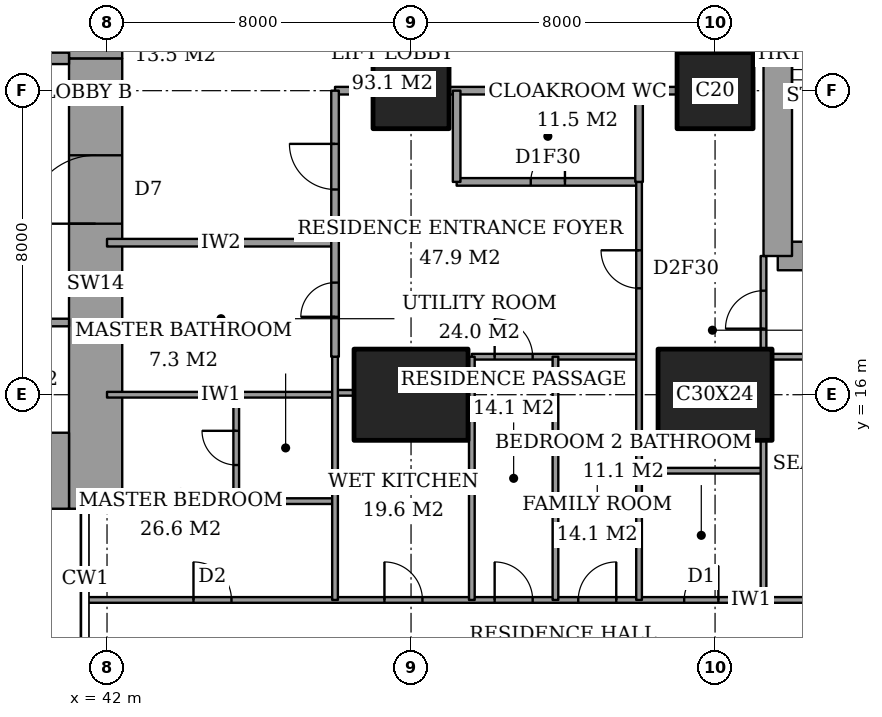
"""IFC4 building model, lengths in metres.
Left out: names, types, materials, properties, quantities, classifications, styles, units other than length and angle.
Written with IfcOpenShell. Run it as: python <this file> out.ifc"""

import sys

from ifc_helpers import new_model, si_unit, direction, frame, frame_2d, origin, origin_2d, place, context, subcontext, project, spatial, rectangle, extrude, element, fill, save


model = new_model("IFC4")
c1 = context("Model", 3, precision=1e-05, world=origin(), true_north=direction((0.0, 1.0)))
c2 = subcontext(c1, "Body", "Model", "MODEL_VIEW")
j1 = project(units=[si_unit("LENGTHUNIT", "METRE"), si_unit("PLANEANGLEUNIT", "RADIAN")], contexts=[c1])
p1 = place(None, origin())
s1 = spatial("IfcSite", under=j1, at=p1, CompositionType="ELEMENT")
p2 = place(p1, origin())
s2 = spatial("IfcBuilding", under=s1, at=p2, CompositionType="ELEMENT")
p3 = place(p2, frame((0.0, 0.0, 87.2)))
s3 = spatial("IfcBuildingStorey", under=s2, at=p3, CompositionType="ELEMENT", Elevation=87.2)
p4 = place(p3, frame((50.0, 16.0, 0.0), z_axis=(0.0, 0.0, 1.0), x_axis=(1.0, 0.0, 0.0)))
e1 = element("IfcColumn", 1, at=p4, inside=s3, PredefinedType="COLUMN", context=c2, shape_type="SweptSolid", body=[
    extrude(rectangle(XDim=3.0, YDim=2.4, at=origin_2d()), origin(), (0.0, 0.0, 1.0), 3.6),
])
p5 = place(p3, frame((50.0, 24.0, 0.0), z_axis=(0.0, 0.0, 1.0), x_axis=(1.0, 0.0, 0.0)))
e2 = element("IfcColumn", 2, at=p5, inside=s3, PredefinedType="COLUMN", context=c2, shape_type="SweptSolid", body=[
    extrude(rectangle(XDim=2.0, YDim=2.0, at=origin_2d()), origin(), (0.0, 0.0, 1.0), 3.6),
])
p6 = place(p3, frame((58.0, 16.0, 0.0), z_axis=(0.0, 0.0, 1.0), x_axis=(1.0, 0.0, 0.0)))
e3 = element("IfcColumn", 3, at=p6, inside=s3, PredefinedType="COLUMN", context=c2, shape_type="SweptSolid", body=[
    extrude(rectangle(XDim=3.0, YDim=2.4, at=origin_2d()), origin(), (0.0, 0.0, 1.0), 3.6),
])
p7 = place(p3, frame((58.0, 24.0, 0.0), z_axis=(0.0, 0.0, 1.0), x_axis=(1.0, 0.0, 0.0)))
e4 = element("IfcColumn", 4, at=p7, inside=s3, PredefinedType="COLUMN", context=c2, shape_type="SweptSolid", body=[
    extrude(rectangle(XDim=2.0, YDim=2.0, at=origin_2d()), origin(), (0.0, 0.0, 1.0), 3.6),
])
p8 = place(p3, frame((37.85, 14.0, 0.0), z_axis=(0.0, 0.0, 1.0), x_axis=(1.0, 0.0, 0.0)))
e5 = element("IfcWall", 5, at=p8, inside=s3, PredefinedType="SHEAR", context=c2, shape_type="SweptSolid", body=[
    extrude(rectangle(XDim=3.15, YDim=2.0, at=frame_2d((1.575, 0.0))), origin(), (0.0, 0.0, 1.0), 3.6),
])
p9 = place(p3, frame((41.7, 13.0, 0.0), z_axis=(0.0, 0.0, 1.0), x_axis=(0.0, 1.0, 0.0)))
e6 = element("IfcWall", 6, at=p9, inside=s3, PredefinedType="SHEAR", context=c2, shape_type="SweptSolid", body=[
    extrude(rectangle(XDim=11.85, YDim=1.4, at=frame_2d((5.925, 0.0))), origin(), (0.0, 0.0, 1.0), 3.6),
])
p10 = place(p9, frame((7.5, 0.0, 0.0)))
e7 = element("IfcOpeningElement", 7, at=p10, cuts=e6, PredefinedType="OPENING", context=c2, shape_type="SweptSolid", body=[
    extrude(rectangle(XDim=1.8, YDim=2.4, at=frame_2d((0.9, 1.2))), frame((0.0, 0.71, 0.0), z_axis=(0.0, -1.0, 0.0), x_axis=(1.0, 0.0, 0.0)), (0.0, 0.0, 1.0), 1.42),
])
p11 = place(p3, frame((41.7, 24.85, 0.0), z_axis=(0.0, 0.0, 1.0), x_axis=(0.0, 1.0, 0.0)))
e8 = element("IfcWall", 8, at=p11, inside=s3, PredefinedType="SHEAR", context=c2, shape_type="SweptSolid", body=[
    extrude(rectangle(XDim=10.15, YDim=1.4, at=frame_2d((5.075, 0.0))), origin(), (0.0, 0.0, 1.0), 3.6),
])
p12 = place(p3, frame((37.85, 24.85, 0.0), z_axis=(0.0, 0.0, 1.0), x_axis=(1.0, 0.0, 0.0)))
e9 = element("IfcWall", 9, at=p12, inside=s3, PredefinedType="SHEAR", context=c2, shape_type="SweptSolid", body=[
    extrude(rectangle(XDim=3.15, YDim=0.3, at=frame_2d((1.575, 0.0))), origin(), (0.0, 0.0, 1.0), 3.6),
])
p13 = place(p12, frame((0.95, 0.0, 0.0)))
e10 = element("IfcOpeningElement", 10, at=p13, cuts=e9, PredefinedType="OPENING", context=c2, shape_type="SweptSolid", body=[
    extrude(rectangle(XDim=1.0, YDim=2.1, at=frame_2d((0.5, 1.05))), frame((0.0, 0.16, 0.0), z_axis=(0.0, -1.0, 0.0), x_axis=(1.0, 0.0, 0.0)), (0.0, 0.0, 1.0), 0.32),
])
p14 = place(p3, frame((59.65, 19.65, 0.0), z_axis=(0.0, 0.0, 1.0), x_axis=(1.0, 0.0, 0.0)))
e11 = element("IfcWall", 11, at=p14, inside=s3, PredefinedType="SHEAR", context=c2, shape_type="SweptSolid", body=[
    extrude(rectangle(XDim=4.45, YDim=0.75, at=frame_2d((2.225, 0.0))), origin(), (0.0, 0.0, 1.0), 3.6),
])
p15 = place(p3, frame((59.65, 28.35, 0.0), z_axis=(0.0, 0.0, 1.0), x_axis=(0.0, -1.0, 0.0)))
e12 = element("IfcWall", 12, at=p15, inside=s3, PredefinedType="SHEAR", context=c2, shape_type="SweptSolid", body=[
    extrude(rectangle(XDim=8.7, YDim=0.75, at=frame_2d((4.35, 0.0))), origin(), (0.0, 0.0, 1.0), 3.6),
])
p16 = place(p15, frame((0.975, 0.0, 0.0)))
e13 = element("IfcOpeningElement", 13, at=p16, cuts=e12, PredefinedType="OPENING", context=c2, shape_type="SweptSolid", body=[
    extrude(rectangle(XDim=1.0, YDim=2.1, at=frame_2d((0.5, 1.05))), frame((0.0, 0.385, 0.0), z_axis=(0.0, -1.0, 0.0), x_axis=(1.0, 0.0, 0.0)), (0.0, 0.0, 1.0), 0.77),
])
p17 = place(p3, frame((41.439, 10.6, 0.0), z_axis=(0.0, 0.0, 1.0), x_axis=(1.0, 0.0, 0.0)))
e14 = element("IfcWall", 14, at=p17, inside=s3, PredefinedType="PARTITIONING", context=c2, shape_type="SweptSolid", body=[
    extrude(rectangle(XDim=25.011, YDim=0.15, at=frame_2d((12.505, 0.0))), origin(), (0.0, 0.0, 1.0), 3.25),
])
p18 = place(p17, frame((10.761, 0.0, 0.0)))
e15 = element("IfcOpeningElement", 15, at=p18, cuts=e14, PredefinedType="OPENING", context=c2, shape_type="SweptSolid", body=[
    extrude(rectangle(XDim=1.0, YDim=2.1, at=frame_2d((0.5, 1.05))), frame((0.0, 0.085, 0.0), z_axis=(0.0, -1.0, 0.0), x_axis=(1.0, 0.0, 0.0)), (0.0, 0.0, 1.0), 0.17),
])
p19 = place(p17, frame((20.924, 0.0, 0.0)))
e16 = element("IfcOpeningElement", 16, at=p19, cuts=e14, PredefinedType="OPENING", context=c2, shape_type="SweptSolid", body=[
    extrude(rectangle(XDim=1.0, YDim=2.1, at=frame_2d((0.5, 1.05))), frame((0.0, 0.085, 0.0), z_axis=(0.0, -1.0, 0.0), x_axis=(1.0, 0.0, 0.0)), (0.0, 0.0, 1.0), 0.17),
])
p20 = place(p17, frame((15.749, 0.0, 0.0)))
e17 = element("IfcOpeningElement", 17, at=p20, cuts=e14, PredefinedType="OPENING", context=c2, shape_type="SweptSolid", body=[
    extrude(rectangle(XDim=0.9, YDim=2.1, at=frame_2d((0.45, 1.05))), frame((0.0, 0.085, 0.0), z_axis=(0.0, -1.0, 0.0), x_axis=(1.0, 0.0, 0.0)), (0.0, 0.0, 1.0), 0.17),
])
p21 = place(p17, frame((12.961, 0.0, 0.0)))
e18 = element("IfcOpeningElement", 18, at=p21, cuts=e14, PredefinedType="OPENING", context=c2, shape_type="SweptSolid", body=[
    extrude(rectangle(XDim=1.0, YDim=2.1, at=frame_2d((0.5, 1.05))), frame((0.0, 0.085, 0.0), z_axis=(0.0, -1.0, 0.0), x_axis=(1.0, 0.0, 0.0)), (0.0, 0.0, 1.0), 0.17),
])
p22 = place(p17, frame((7.861, 0.0, 0.0)))
e19 = element("IfcOpeningElement", 19, at=p22, cuts=e14, PredefinedType="OPENING", context=c2, shape_type="SweptSolid", body=[
    extrude(rectangle(XDim=1.0, YDim=2.1, at=frame_2d((0.5, 1.05))), frame((0.0, 0.085, 0.0), z_axis=(0.0, -1.0, 0.0), x_axis=(1.0, 0.0, 0.0)), (0.0, 0.0, 1.0), 0.17),
])
p23 = place(p17, frame((2.836, 0.0, 0.0)))
e20 = element("IfcOpeningElement", 20, at=p23, cuts=e14, PredefinedType="OPENING", context=c2, shape_type="SweptSolid", body=[
    extrude(rectangle(XDim=1.0, YDim=2.1, at=frame_2d((0.5, 1.05))), frame((0.0, 0.085, 0.0), z_axis=(0.0, -1.0, 0.0), x_axis=(1.0, 0.0, 0.0)), (0.0, 0.0, 1.0), 0.17),
])
p24 = place(p3, frame((45.4, 13.2, 0.0), z_axis=(0.0, 0.0, 1.0), x_axis=(1.0, 0.0, 0.0)))
e21 = element("IfcWall", 21, at=p24, inside=s3, PredefinedType="PARTITIONING", context=c2, shape_type="SweptSolid", body=[
    extrude(rectangle(XDim=2.6, YDim=0.15, at=frame_2d((1.3, 0.0))), origin(), (0.0, 0.0, 1.0), 3.25),
])
p25 = place(p3, frame((56.0, 14.0, 0.0), z_axis=(0.0, 0.0, 1.0), x_axis=(1.0, 0.0, 0.0)))
e22 = element("IfcWall", 22, at=p25, inside=s3, PredefinedType="PARTITIONING", context=c2, shape_type="SweptSolid", body=[
    extrude(rectangle(XDim=3.275, YDim=0.15, at=frame_2d((1.637, 0.0))), origin(), (0.0, 0.0, 1.0), 3.25),
])
p26 = place(p3, frame((42.0, 16.0, 0.0), z_axis=(0.0, 0.0, 1.0), x_axis=(1.0, 0.0, 0.0)))
e23 = element("IfcWall", 23, at=p26, inside=s3, PredefinedType="PARTITIONING", context=c2, shape_type="SweptSolid", body=[
    extrude(rectangle(XDim=6.0, YDim=0.15, at=frame_2d((3.0, 0.0))), origin(), (0.0, 0.0, 1.0), 3.25),
])
p27 = place(p3, frame((48.0, 16.05, 0.0), z_axis=(0.0, 0.0, 1.0), x_axis=(1.0, 0.0, 0.0)))
e24 = element("IfcWall", 24, at=p27, inside=s3, PredefinedType="PARTITIONING", context=c2, shape_type="SweptSolid", body=[
    extrude(rectangle(XDim=0.5, YDim=0.15, at=frame_2d((0.25, 0.0))), origin(), (0.0, 0.0, 1.0), 3.25),
])
p28 = place(p3, frame((51.6, 17.0, 0.0), z_axis=(0.0, 0.0, 1.0), x_axis=(1.0, 0.0, 0.0)))
e25 = element("IfcWall", 25, at=p28, inside=s3, PredefinedType="PARTITIONING", context=c2, shape_type="SweptSolid", body=[
    extrude(rectangle(XDim=4.4, YDim=0.15, at=frame_2d((2.2, 0.0))), origin(), (0.0, 0.0, 1.0), 3.25),
])
p29 = place(p28, frame((0.6, 0.0, 0.0)))
e26 = element("IfcOpeningElement", 26, at=p29, cuts=e25, PredefinedType="OPENING", context=c2, shape_type="SweptSolid", body=[
    extrude(rectangle(XDim=1.0, YDim=2.1, at=frame_2d((0.5, 1.05))), frame((0.0, 0.085, 0.0), z_axis=(0.0, -1.0, 0.0), x_axis=(1.0, 0.0, 0.0)), (0.0, 0.0, 1.0), 0.17),
])
p30 = place(p3, frame((59.5, 17.0, 0.0), z_axis=(0.0, 0.0, 1.0), x_axis=(1.0, 0.0, 0.0)))
e27 = element("IfcWall", 27, at=p30, inside=s3, PredefinedType="PARTITIONING", context=c2, shape_type="SweptSolid", body=[
    extrude(rectangle(XDim=5.15, YDim=0.15, at=frame_2d((2.575, 0.0))), origin(), (0.0, 0.0, 1.0), 3.25),
])
p31 = place(p3, frame((42.0, 20.0, 0.0), z_axis=(0.0, 0.0, 1.0), x_axis=(1.0, 0.0, 0.0)))
e28 = element("IfcWall", 28, at=p31, inside=s3, PredefinedType="PARTITIONING", context=c2, shape_type="SweptSolid", body=[
    extrude(rectangle(XDim=6.0, YDim=0.2, at=frame_2d((3.0, 0.0))), origin(), (0.0, 0.0, 1.0), 3.25),
])
p32 = place(p3, frame((51.2, 21.6, 0.0), z_axis=(0.0, 0.0, 1.0), x_axis=(1.0, 0.0, 0.0)))
e29 = element("IfcWall", 29, at=p32, inside=s3, PredefinedType="PARTITIONING", context=c2, shape_type="SweptSolid", body=[
    extrude(rectangle(XDim=4.8, YDim=0.2, at=frame_2d((2.4, 0.0))), origin(), (0.0, 0.0, 1.0), 3.25),
])
p33 = place(p32, frame((1.95, 0.0, 0.0)))
e30 = element("IfcOpeningElement", 30, at=p33, cuts=e29, PredefinedType="OPENING", context=c2, shape_type="SweptSolid", body=[
    extrude(rectangle(XDim=0.9, YDim=2.1, at=frame_2d((0.45, 1.05))), frame((0.0, 0.11, 0.0), z_axis=(0.0, -1.0, 0.0), x_axis=(1.0, 0.0, 0.0)), (0.0, 0.0, 1.0), 0.22),
])
p34 = place(p3, frame((48.0, 24.0, 0.0), z_axis=(0.0, 0.0, 1.0), x_axis=(1.0, 0.0, 0.0)))
e31 = element("IfcWall", 31, at=p34, inside=s3, PredefinedType="PARTITIONING", context=c2, shape_type="SweptSolid", body=[
    extrude(rectangle(XDim=1.0, YDim=0.2, at=frame_2d((0.5, 0.0))), origin(), (0.0, 0.0, 1.0), 3.25),
])
p35 = place(p3, frame((51.0, 24.0, 0.0), z_axis=(0.0, 0.0, 1.0), x_axis=(1.0, 0.0, 0.0)))
e32 = element("IfcWall", 32, at=p35, inside=s3, PredefinedType="PARTITIONING", context=c2, shape_type="SweptSolid", body=[
    extrude(rectangle(XDim=6.0, YDim=0.2, at=frame_2d((3.0, 0.0))), origin(), (0.0, 0.0, 1.0), 3.25),
])
p36 = place(p3, frame((45.4, 13.2, 0.0), z_axis=(0.0, 0.0, 1.0), x_axis=(0.0, 1.0, 0.0)))
e33 = element("IfcWall", 33, at=p36, inside=s3, PredefinedType="PARTITIONING", context=c2, shape_type="SweptSolid", body=[
    extrude(rectangle(XDim=2.8, YDim=0.15, at=frame_2d((1.4, 0.0))), origin(), (0.0, 0.0, 1.0), 3.25),
])
p37 = place(p36, frame((0.95, 0.0, 0.0)))
e34 = element("IfcOpeningElement", 34, at=p37, cuts=e33, PredefinedType="OPENING", context=c2, shape_type="SweptSolid", body=[
    extrude(rectangle(XDim=0.9, YDim=2.1, at=frame_2d((0.45, 1.05))), frame((0.0, 0.085, 0.0), z_axis=(0.0, -1.0, 0.0), x_axis=(1.0, 0.0, 0.0)), (0.0, 0.0, 1.0), 0.17),
])
p38 = place(p3, frame((48.0, 17.0, 0.0), z_axis=(0.0, 0.0, 1.0), x_axis=(0.0, 1.0, 0.0)))
e35 = element("IfcWall", 35, at=p38, inside=s3, PredefinedType="PARTITIONING", context=c2, shape_type="SweptSolid", body=[
    extrude(rectangle(XDim=7.0, YDim=0.2, at=frame_2d((3.5, 0.0))), origin(), (0.0, 0.0, 1.0), 3.25),
])
p39 = place(p38, frame((4.4, 0.0, 0.0)))
e36 = element("IfcOpeningElement", 36, at=p39, cuts=e35, PredefinedType="OPENING", context=c2, shape_type="SweptSolid", body=[
    extrude(rectangle(XDim=1.2, YDim=2.4, at=frame_2d((0.6, 1.2))), frame((0.0, 0.11, 0.0), z_axis=(0.0, -1.0, 0.0), x_axis=(1.0, 0.0, 0.0)), (0.0, 0.0, 1.0), 0.22),
])
p40 = place(p38, frame((1.05, 0.0, 0.0)))
e37 = element("IfcOpeningElement", 37, at=p40, cuts=e35, PredefinedType="OPENING", context=c2, shape_type="SweptSolid", body=[
    extrude(rectangle(XDim=0.9, YDim=2.1, at=frame_2d((0.45, 1.05))), frame((0.0, 0.11, 0.0), z_axis=(0.0, -1.0, 0.0), x_axis=(1.0, 0.0, 0.0)), (0.0, 0.0, 1.0), 0.22),
])
p41 = place(p3, frame((48.0, 10.6, 0.0), z_axis=(0.0, 0.0, 1.0), x_axis=(0.0, 1.0, 0.0)))
e38 = element("IfcWall", 38, at=p41, inside=s3, PredefinedType="PARTITIONING", context=c2, shape_type="SweptSolid", body=[
    extrude(rectangle(XDim=6.4, YDim=0.15, at=frame_2d((3.2, 0.0))), origin(), (0.0, 0.0, 1.0), 3.25),
])
p42 = place(p3, frame((51.2, 21.6, 0.0), z_axis=(0.0, 0.0, 1.0), x_axis=(0.0, 1.0, 0.0)))
e39 = element("IfcWall", 39, at=p42, inside=s3, PredefinedType="PARTITIONING", context=c2, shape_type="SweptSolid", body=[
    extrude(rectangle(XDim=2.4, YDim=0.2, at=frame_2d((1.2, 0.0))), origin(), (0.0, 0.0, 1.0), 3.25),
])
for number, where, z_axis, x_axis in (
    (40, (51.6, 10.6, 0.0), (0.0, 0.0, 1.0), (0.0, 1.0, 0.0)),
    (41, (53.8, 10.6, 0.0), (0.0, 0.0, 1.0), (0.0, 1.0, 0.0)),
):
    element("IfcWall", number, at=place(p3, frame(where, z_axis=z_axis, x_axis=x_axis)), inside=s3, PredefinedType="PARTITIONING", context=c2, shape_type="SweptSolid", body=[
        extrude(rectangle(XDim=6.4, YDim=0.15, at=frame_2d((3.2, 0.0))), origin(), (0.0, 0.0, 1.0), 3.25),
    ])
p43 = place(p3, frame((56.0, 21.6, 0.0), z_axis=(0.0, 0.0, 1.0), x_axis=(0.0, 1.0, 0.0)))
e42 = element("IfcWall", 42, at=p43, inside=s3, PredefinedType="PARTITIONING", context=c2, shape_type="SweptSolid", body=[
    extrude(rectangle(XDim=2.4, YDim=0.2, at=frame_2d((1.2, 0.0))), origin(), (0.0, 0.0, 1.0), 3.25),
])
p44 = place(p3, frame((56.0, 10.6, 0.0), z_axis=(0.0, 0.0, 1.0), x_axis=(0.0, 1.0, 0.0)))
e43 = element("IfcWall", 43, at=p44, inside=s3, PredefinedType="PARTITIONING", context=c2, shape_type="SweptSolid", body=[
    extrude(rectangle(XDim=11.0, YDim=0.15, at=frame_2d((5.5, 0.0))), origin(), (0.0, 0.0, 1.0), 3.25),
])
p45 = place(p44, frame((8.2, 0.0, 0.0)))
e44 = element("IfcOpeningElement", 44, at=p45, cuts=e43, PredefinedType="OPENING", context=c2, shape_type="SweptSolid", body=[
    extrude(rectangle(XDim=1.0, YDim=2.1, at=frame_2d((0.5, 1.05))), frame((0.0, 0.085, 0.0), z_axis=(0.0, -1.0, 0.0), x_axis=(1.0, 0.0, 0.0)), (0.0, 0.0, 1.0), 0.17),
])
p46 = place(p3, frame((59.275, 10.6, 0.0), z_axis=(0.0, 0.0, 1.0), x_axis=(0.0, 1.0, 0.0)))
e45 = element("IfcWall", 45, at=p46, inside=s3, PredefinedType="PARTITIONING", context=c2, shape_type="SweptSolid", body=[
    extrude(rectangle(XDim=4.2, YDim=0.15, at=frame_2d((2.1, 0.0))), origin(), (0.0, 0.0, 1.0), 3.25),
])
p47 = place(p3, frame((59.275, 17.2, 0.0), z_axis=(0.0, 0.0, 1.0), x_axis=(0.0, 1.0, 0.0)))
e46 = element("IfcWall", 46, at=p47, inside=s3, PredefinedType="PARTITIONING", context=c2, shape_type="SweptSolid", body=[
    extrude(rectangle(XDim=2.45, YDim=0.15, at=frame_2d((1.225, 0.0))), origin(), (0.0, 0.0, 1.0), 3.25),
])
p48 = place(p47, frame((0.538, 0.0, 0.0)))
e47 = element("IfcOpeningElement", 47, at=p48, cuts=e46, PredefinedType="OPENING", context=c2, shape_type="SweptSolid", body=[
    extrude(rectangle(XDim=1.0, YDim=2.1, at=frame_2d((0.5, 1.05))), frame((0.0, 0.085, 0.0), z_axis=(0.0, -1.0, 0.0), x_axis=(1.0, 0.0, 0.0)), (0.0, 0.0, 1.0), 0.17),
])
p49 = place(p3, frame((28.3, 17.9, 0.0), z_axis=(0.0, 0.0, 1.0), x_axis=(1.0, 0.0, 0.0)))
e48 = element("IfcWall", 48, at=p49, inside=s3, PredefinedType="PARTITIONING", context=c2, shape_type="SweptSolid", body=[
    extrude(rectangle(XDim=12.7, YDim=0.2, at=frame_2d((6.35, 0.0))), origin(), (0.0, 0.0, 1.0), 3.6),
])
p50 = place(p49, frame((0.95, 0.0, 0.0)))
e49 = element("IfcOpeningElement", 49, at=p50, cuts=e48, PredefinedType="OPENING", context=c2, shape_type="SweptSolid", body=[
    extrude(rectangle(XDim=1.1, YDim=2.1, at=frame_2d((0.55, 1.05))), frame((0.0, 0.11, 0.0), z_axis=(0.0, -1.0, 0.0), x_axis=(1.0, 0.0, 0.0)), (0.0, 0.0, 1.0), 0.22),
])
p51 = place(p49, frame((4.15, 0.0, 0.0)))
e50 = element("IfcOpeningElement", 50, at=p51, cuts=e48, PredefinedType="OPENING", context=c2, shape_type="SweptSolid", body=[
    extrude(rectangle(XDim=1.1, YDim=2.1, at=frame_2d((0.55, 1.05))), frame((0.0, 0.11, 0.0), z_axis=(0.0, -1.0, 0.0), x_axis=(1.0, 0.0, 0.0)), (0.0, 0.0, 1.0), 0.22),
])
p52 = place(p49, frame((7.35, 0.0, 0.0)))
e51 = element("IfcOpeningElement", 51, at=p52, cuts=e48, PredefinedType="OPENING", context=c2, shape_type="SweptSolid", body=[
    extrude(rectangle(XDim=1.1, YDim=2.1, at=frame_2d((0.55, 1.05))), frame((0.0, 0.11, 0.0), z_axis=(0.0, -1.0, 0.0), x_axis=(1.0, 0.0, 0.0)), (0.0, 0.0, 1.0), 0.22),
])
p53 = place(p49, frame((10.6, 0.0, 0.0)))
e52 = element("IfcOpeningElement", 52, at=p53, cuts=e48, PredefinedType="OPENING", context=c2, shape_type="SweptSolid", body=[
    extrude(rectangle(XDim=1.2, YDim=2.1, at=frame_2d((0.6, 1.05))), frame((0.0, 0.11, 0.0), z_axis=(0.0, -1.0, 0.0), x_axis=(1.0, 0.0, 0.0)), (0.0, 0.0, 1.0), 0.22),
])
p54 = place(p18, origin())
e53 = element("IfcDoor", 53, at=p54, inside=s3, OperationType="SINGLE_SWING_RIGHT", PredefinedType="DOOR", context=c2, shape_type="SweptSolid", body=[
    extrude(rectangle(XDim=1.0, YDim=2.1, at=frame_2d((0.5, 1.05))), frame((0.0, 0.025, 0.0), z_axis=(0.0, -1.0, 0.0), x_axis=(1.0, 0.0, 0.0)), (0.0, 0.0, 1.0), 0.05),
])
fill(e15, e53)
p55 = place(p48, origin())
e54 = element("IfcDoor", 54, at=p55, inside=s3, OperationType="SINGLE_SWING_RIGHT", PredefinedType="DOOR", context=c2, shape_type="SweptSolid", body=[
    extrude(rectangle(XDim=1.0, YDim=2.1, at=frame_2d((0.5, 1.05))), frame((0.0, 0.025, 0.0), z_axis=(0.0, -1.0, 0.0), x_axis=(1.0, 0.0, 0.0)), (0.0, 0.0, 1.0), 0.05),
])
fill(e47, e54)
p56 = place(p20, origin())
e55 = element("IfcDoor", 55, at=p56, inside=s3, OperationType="SINGLE_SWING_LEFT", PredefinedType="DOOR", context=c2, shape_type="SweptSolid", body=[
    extrude(rectangle(XDim=0.9, YDim=2.1, at=frame_2d((0.45, 1.05))), frame((0.0, 0.025, 0.0), z_axis=(0.0, -1.0, 0.0), x_axis=(1.0, 0.0, 0.0)), (0.0, 0.0, 1.0), 0.05),
])
fill(e17, e55)
p57 = place(p45, origin())
e56 = element("IfcDoor", 56, at=p57, inside=s3, OperationType="SINGLE_SWING_LEFT", PredefinedType="DOOR", context=c2, shape_type="SweptSolid", body=[
    extrude(rectangle(XDim=1.0, YDim=2.1, at=frame_2d((0.5, 1.05))), frame((0.0, 0.025, 0.0), z_axis=(0.0, -1.0, 0.0), x_axis=(1.0, 0.0, 0.0)), (0.0, 0.0, 1.0), 0.05),
])
fill(e44, e56)
p58 = place(p33, origin())
e57 = element("IfcDoor", 57, at=p58, inside=s3, OperationType="SINGLE_SWING_LEFT", PredefinedType="DOOR", context=c2, shape_type="SweptSolid", body=[
    extrude(rectangle(XDim=0.9, YDim=2.1, at=frame_2d((0.45, 1.05))), frame((0.0, 0.025, 0.0), z_axis=(0.0, -1.0, 0.0), x_axis=(1.0, 0.0, 0.0)), (0.0, 0.0, 1.0), 0.05),
])
fill(e30, e57)
p59 = place(p39, origin())
e58 = element("IfcDoor", 58, at=p59, inside=s3, OperationType="SINGLE_SWING_LEFT", PredefinedType="DOOR", context=c2, shape_type="SweptSolid", body=[
    extrude(rectangle(XDim=1.2, YDim=2.4, at=frame_2d((0.6, 1.2))), frame((0.0, 0.025, 0.0), z_axis=(0.0, -1.0, 0.0), x_axis=(1.0, 0.0, 0.0)), (0.0, 0.0, 1.0), 0.05),
])
fill(e36, e58)
p60 = place(p21, origin())
e59 = element("IfcDoor", 59, at=p60, inside=s3, OperationType="SINGLE_SWING_LEFT", PredefinedType="DOOR", context=c2, shape_type="SweptSolid", body=[
    extrude(rectangle(XDim=1.0, YDim=2.1, at=frame_2d((0.5, 1.05))), frame((0.0, 0.025, 0.0), z_axis=(0.0, -1.0, 0.0), x_axis=(1.0, 0.0, 0.0)), (0.0, 0.0, 1.0), 0.05),
])
fill(e18, e59)
p61 = place(p29, origin())
e60 = element("IfcDoor", 60, at=p61, inside=s3, OperationType="SINGLE_SWING_RIGHT", PredefinedType="DOOR", context=c2, shape_type="SweptSolid", body=[
    extrude(rectangle(XDim=1.0, YDim=2.1, at=frame_2d((0.5, 1.05))), frame((0.0, 0.025, 0.0), z_axis=(0.0, -1.0, 0.0), x_axis=(1.0, 0.0, 0.0)), (0.0, 0.0, 1.0), 0.05),
])
fill(e26, e60)
p62 = place(p22, origin())
e61 = element("IfcDoor", 61, at=p62, inside=s3, OperationType="SINGLE_SWING_RIGHT", PredefinedType="DOOR", context=c2, shape_type="SweptSolid", body=[
    extrude(rectangle(XDim=1.0, YDim=2.1, at=frame_2d((0.5, 1.05))), frame((0.0, 0.025, 0.0), z_axis=(0.0, -1.0, 0.0), x_axis=(1.0, 0.0, 0.0)), (0.0, 0.0, 1.0), 0.05),
])
fill(e19, e61)
p63 = place(p37, origin())
e62 = element("IfcDoor", 62, at=p63, inside=s3, OperationType="SINGLE_SWING_LEFT", PredefinedType="DOOR", context=c2, shape_type="SweptSolid", body=[
    extrude(rectangle(XDim=0.9, YDim=2.1, at=frame_2d((0.45, 1.05))), frame((0.0, 0.025, 0.0), z_axis=(0.0, -1.0, 0.0), x_axis=(1.0, 0.0, 0.0)), (0.0, 0.0, 1.0), 0.05),
])
fill(e34, e62)
p64 = place(p23, origin())
e63 = element("IfcDoor", 63, at=p64, inside=s3, OperationType="SINGLE_SWING_RIGHT", PredefinedType="DOOR", context=c2, shape_type="SweptSolid", body=[
    extrude(rectangle(XDim=1.0, YDim=2.1, at=frame_2d((0.5, 1.05))), frame((0.0, 0.025, 0.0), z_axis=(0.0, -1.0, 0.0), x_axis=(1.0, 0.0, 0.0)), (0.0, 0.0, 1.0), 0.05),
])
fill(e20, e63)
p65 = place(p40, origin())
e64 = element("IfcDoor", 64, at=p65, inside=s3, OperationType="SINGLE_SWING_RIGHT", PredefinedType="DOOR", context=c2, shape_type="SweptSolid", body=[
    extrude(rectangle(XDim=0.9, YDim=2.1, at=frame_2d((0.45, 1.05))), frame((0.0, 0.025, 0.0), z_axis=(0.0, -1.0, 0.0), x_axis=(1.0, 0.0, 0.0)), (0.0, 0.0, 1.0), 0.05),
])
fill(e37, e64)
p66 = place(p10, origin())
e65 = element("IfcDoor", 65, at=p66, inside=s3, OperationType="DOUBLE_DOOR_DOUBLE_SWING", PredefinedType="DOOR", context=c2, shape_type="SweptSolid", body=[
    extrude(rectangle(XDim=1.8, YDim=2.4, at=frame_2d((0.9, 1.2))), frame((0.0, 0.025, 0.0), z_axis=(0.0, -1.0, 0.0), x_axis=(1.0, 0.0, 0.0)), (0.0, 0.0, 1.0), 0.05),
])
fill(e7, e65)
save(model, sys.argv[1])
